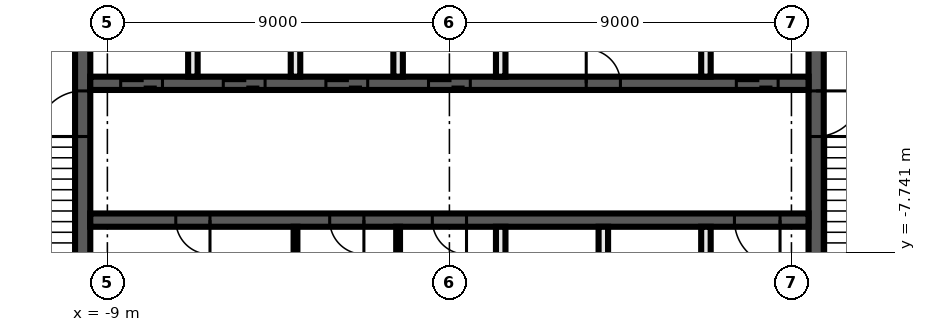
"""IFC4 building model, lengths in metres.
Left out: names, types, materials, properties, quantities, classifications, styles, units other than length and angle.
Written with IfcOpenShell. Run it as: python <this file> out.ifc"""

import sys

from ifc_helpers import new_model, si_unit, direction, frame, frame_2d, origin, place, context, subcontext, project, spatial, rectangle, extrude, element, fill, save


model = new_model("IFC4")
c1 = context("Model", 3, precision=1e-05, world=origin(), true_north=direction((0.0, 1.0)))
c2 = subcontext(c1, "Body", "Model", "MODEL_VIEW")
j1 = project(units=[si_unit("LENGTHUNIT", "METRE"), si_unit("PLANEANGLEUNIT", "RADIAN")], contexts=[c1])
p1 = place(None, origin())
s1 = spatial("IfcSite", under=j1, at=p1, CompositionType="ELEMENT")
p2 = place(p1, origin())
s2 = spatial("IfcBuilding", under=s1, at=p2, CompositionType="ELEMENT")
p3 = place(p2, frame((0.0, 0.0, 245.4)))
s3 = spatial("IfcBuildingStorey", under=s2, at=p3, CompositionType="ELEMENT", Elevation=245.4)
p4 = place(p3, frame((9.65, -2.3, 0.0), z_axis=(0.0, 0.0, 1.0), x_axis=(0.0, -1.0, 0.0)))
e1 = element("IfcWall", 1, at=p4, inside=s3, PredefinedType="SHEAR", context=c2, shape_type="SweptSolid", body=[
    extrude(rectangle(XDim=7.5, YDim=0.4, at=frame_2d((3.75, 0.0))), origin(), (0.0, 0.0, 1.0), 3.82),
])
p5 = place(p4, frame((1.2, 0.0, 0.0)))
e2 = element("IfcOpeningElement", 2, at=p5, cuts=e1, PredefinedType="OPENING", context=c2, shape_type="SweptSolid", body=[
    extrude(rectangle(XDim=1.2, YDim=2.1, at=frame_2d((0.6, 1.05))), frame((0.0, 0.21, 0.0), z_axis=(0.0, -1.0, 0.0), x_axis=(1.0, 0.0, 0.0)), (0.0, 0.0, 1.0), 0.42),
])
p6 = place(p3, frame((-9.65, -9.8, 0.0), z_axis=(0.0, 0.0, 1.0), x_axis=(0.0, 1.0, 0.0)))
e3 = element("IfcWall", 3, at=p6, inside=s3, PredefinedType="SHEAR", context=c2, shape_type="SweptSolid", body=[
    extrude(rectangle(XDim=7.5, YDim=0.4, at=frame_2d((3.75, 0.0))), origin(), (0.0, 0.0, 1.0), 3.82),
])
p7 = place(p6, frame((5.1, 0.0, 0.0)))
e4 = element("IfcOpeningElement", 4, at=p7, cuts=e3, PredefinedType="OPENING", context=c2, shape_type="SweptSolid", body=[
    extrude(rectangle(XDim=1.2, YDim=2.1, at=frame_2d((0.6, 1.05))), frame((0.0, 0.21, 0.0), z_axis=(0.0, -1.0, 0.0), x_axis=(1.0, 0.0, 0.0)), (0.0, 0.0, 1.0), 0.42),
])
p8 = place(p3, frame((-9.45, -3.3, 0.0), z_axis=(0.0, 0.0, 1.0), x_axis=(1.0, 0.0, 0.0)))
e5 = element("IfcWall", 5, at=p8, inside=s3, PredefinedType="SHEAR", context=c2, shape_type="SweptSolid", body=[
    extrude(rectangle(XDim=18.9, YDim=0.35, at=frame_2d((9.45, 0.0))), origin(), (0.0, 0.0, 1.0), 3.82),
])
p9 = place(p8, frame((0.8, 0.0, 0.0)))
e6 = element("IfcOpeningElement", 6, at=p9, cuts=e5, PredefinedType="OPENING", context=c2, shape_type="SweptSolid", body=[
    extrude(rectangle(XDim=1.1, YDim=2.1, at=frame_2d((0.55, 1.05))), frame((0.0, 0.185, 0.0), z_axis=(0.0, -1.0, 0.0), x_axis=(1.0, 0.0, 0.0)), (0.0, 0.0, 1.0), 0.37),
])
p10 = place(p8, frame((3.5, 0.0, 0.0)))
e7 = element("IfcOpeningElement", 7, at=p10, cuts=e5, PredefinedType="OPENING", context=c2, shape_type="SweptSolid", body=[
    extrude(rectangle(XDim=1.1, YDim=2.1, at=frame_2d((0.55, 1.05))), frame((0.0, 0.185, 0.0), z_axis=(0.0, -1.0, 0.0), x_axis=(1.0, 0.0, 0.0)), (0.0, 0.0, 1.0), 0.37),
])
p11 = place(p8, frame((6.2, 0.0, 0.0)))
e8 = element("IfcOpeningElement", 8, at=p11, cuts=e5, PredefinedType="OPENING", context=c2, shape_type="SweptSolid", body=[
    extrude(rectangle(XDim=1.1, YDim=2.1, at=frame_2d((0.55, 1.05))), frame((0.0, 0.185, 0.0), z_axis=(0.0, -1.0, 0.0), x_axis=(1.0, 0.0, 0.0)), (0.0, 0.0, 1.0), 0.37),
])
p12 = place(p8, frame((8.9, 0.0, 0.0)))
e9 = element("IfcOpeningElement", 9, at=p12, cuts=e5, PredefinedType="OPENING", context=c2, shape_type="SweptSolid", body=[
    extrude(rectangle(XDim=1.1, YDim=2.1, at=frame_2d((0.55, 1.05))), frame((0.0, 0.185, 0.0), z_axis=(0.0, -1.0, 0.0), x_axis=(1.0, 0.0, 0.0)), (0.0, 0.0, 1.0), 0.37),
])
p13 = place(p8, frame((17.0, 0.0, 0.0)))
e10 = element("IfcOpeningElement", 10, at=p13, cuts=e5, PredefinedType="OPENING", context=c2, shape_type="SweptSolid", body=[
    extrude(rectangle(XDim=1.1, YDim=2.1, at=frame_2d((0.55, 1.05))), frame((0.0, 0.185, 0.0), z_axis=(0.0, -1.0, 0.0), x_axis=(1.0, 0.0, 0.0)), (0.0, 0.0, 1.0), 0.37),
])
p14 = place(p8, frame((13.05, 0.0, 0.0)))
e11 = element("IfcOpeningElement", 11, at=p14, cuts=e5, PredefinedType="OPENING", context=c2, shape_type="SweptSolid", body=[
    extrude(rectangle(XDim=0.9, YDim=2.1, at=frame_2d((0.45, 1.05))), frame((0.0, 0.185, 0.0), z_axis=(0.0, -1.0, 0.0), x_axis=(1.0, 0.0, 0.0)), (0.0, 0.0, 1.0), 0.37),
])
p15 = place(p3, frame((9.45, -6.9, 0.0), z_axis=(0.0, 0.0, 1.0), x_axis=(-1.0, 0.0, 0.0)))
e12 = element("IfcWall", 12, at=p15, inside=s3, PredefinedType="SHEAR", context=c2, shape_type="SweptSolid", body=[
    extrude(rectangle(XDim=18.9, YDim=0.35, at=frame_2d((9.45, 0.0))), origin(), (0.0, 0.0, 1.0), 3.82),
])
p16 = place(p15, frame((0.75, 0.0, 0.0)))
e13 = element("IfcOpeningElement", 13, at=p16, cuts=e12, PredefinedType="OPENING", context=c2, shape_type="SweptSolid", body=[
    extrude(rectangle(XDim=1.2, YDim=2.1, at=frame_2d((0.6, 1.05))), frame((0.0, 0.185, 0.0), z_axis=(0.0, -1.0, 0.0), x_axis=(1.0, 0.0, 0.0)), (0.0, 0.0, 1.0), 0.37),
])
p17 = place(p15, frame((15.75, 0.0, 0.0)))
e14 = element("IfcOpeningElement", 14, at=p17, cuts=e12, PredefinedType="OPENING", context=c2, shape_type="SweptSolid", body=[
    extrude(rectangle(XDim=0.9, YDim=2.1, at=frame_2d((0.45, 1.05))), frame((0.0, 0.185, 0.0), z_axis=(0.0, -1.0, 0.0), x_axis=(1.0, 0.0, 0.0)), (0.0, 0.0, 1.0), 0.37),
])
p18 = place(p15, frame((11.7, 0.0, 0.0)))
e15 = element("IfcOpeningElement", 15, at=p18, cuts=e12, PredefinedType="OPENING", context=c2, shape_type="SweptSolid", body=[
    extrude(rectangle(XDim=0.9, YDim=2.1, at=frame_2d((0.45, 1.05))), frame((0.0, 0.185, 0.0), z_axis=(0.0, -1.0, 0.0), x_axis=(1.0, 0.0, 0.0)), (0.0, 0.0, 1.0), 0.37),
])
p19 = place(p15, frame((9.0, 0.0, 0.0)))
e16 = element("IfcOpeningElement", 16, at=p19, cuts=e12, PredefinedType="OPENING", context=c2, shape_type="SweptSolid", body=[
    extrude(rectangle(XDim=0.9, YDim=2.1, at=frame_2d((0.45, 1.05))), frame((0.0, 0.185, 0.0), z_axis=(0.0, -1.0, 0.0), x_axis=(1.0, 0.0, 0.0)), (0.0, 0.0, 1.0), 0.37),
])
for number, where, z_axis, x_axis in (
    (17, (6.75, -9.8, 0.0), (0.0, 0.0, 1.0), (0.0, 1.0, 0.0)),
    (18, (6.75, -3.125, 0.0), (0.0, 0.0, 1.0), (0.0, 1.0, 0.0)),
    (19, (4.05, -9.8, 0.0), (0.0, 0.0, 1.0), (0.0, 1.0, 0.0)),
    (20, (1.35, -9.8, 0.0), (0.0, 0.0, 1.0), (0.0, 1.0, 0.0)),
    (21, (1.35, -3.125, 0.0), (0.0, 0.0, 1.0), (0.0, 1.0, 0.0)),
):
    element("IfcWall", number, at=place(p3, frame(where, z_axis=z_axis, x_axis=x_axis)), inside=s3, PredefinedType="SOLIDWALL", context=c2, shape_type="SweptSolid", body=[
        extrude(rectangle(XDim=2.725, YDim=0.25, at=frame_2d((1.363, 0.0))), origin(), (0.0, 0.0, 1.0), 3.82),
    ])
p20 = place(p3, frame((-1.35, -9.8, 0.0), z_axis=(0.0, 0.0, 1.0), x_axis=(0.0, 1.0, 0.0)))
e22 = element("IfcWall", 22, at=p20, inside=s3, PredefinedType="PARTITIONING", context=c2, shape_type="SweptSolid", body=[
    extrude(rectangle(XDim=2.725, YDim=0.1, at=frame_2d((1.363, 0.0))), origin(), (0.0, 0.0, 1.0), 3.82),
])
p21 = place(p3, frame((-1.35, -3.125, 0.0), z_axis=(0.0, 0.0, 1.0), x_axis=(0.0, 1.0, 0.0)))
e23 = element("IfcWall", 23, at=p21, inside=s3, PredefinedType="SOLIDWALL", context=c2, shape_type="SweptSolid", body=[
    extrude(rectangle(XDim=2.725, YDim=0.25, at=frame_2d((1.363, 0.0))), origin(), (0.0, 0.0, 1.0), 3.82),
])
p22 = place(p3, frame((-4.05, -9.8, 0.0), z_axis=(0.0, 0.0, 1.0), x_axis=(0.0, 1.0, 0.0)))
e24 = element("IfcWall", 24, at=p22, inside=s3, PredefinedType="PARTITIONING", context=c2, shape_type="SweptSolid", body=[
    extrude(rectangle(XDim=2.725, YDim=0.1, at=frame_2d((1.363, 0.0))), origin(), (0.0, 0.0, 1.0), 3.82),
])
for number, where, z_axis, x_axis in (
    (25, (-4.05, -3.125, 0.0), (0.0, 0.0, 1.0), (0.0, 1.0, 0.0)),
    (26, (-6.75, -3.125, 0.0), (0.0, 0.0, 1.0), (0.0, 1.0, 0.0)),
):
    element("IfcWall", number, at=place(p3, frame(where, z_axis=z_axis, x_axis=x_axis)), inside=s3, PredefinedType="SOLIDWALL", context=c2, shape_type="SweptSolid", body=[
        extrude(rectangle(XDim=2.725, YDim=0.25, at=frame_2d((1.363, 0.0))), origin(), (0.0, 0.0, 1.0), 3.82),
    ])
p23 = place(p9, origin())
e27 = element("IfcDoor", 27, at=p23, inside=s3, OperationType="DOUBLE_DOOR_SLIDING", PredefinedType="DOOR", context=c2, shape_type="SweptSolid", body=[
    extrude(rectangle(XDim=1.1, YDim=2.1, at=frame_2d((0.55, 1.05))), frame((0.0, 0.025, 0.0), z_axis=(0.0, -1.0, 0.0), x_axis=(1.0, 0.0, 0.0)), (0.0, 0.0, 1.0), 0.05),
])
fill(e6, e27)
p24 = place(p10, origin())
e28 = element("IfcDoor", 28, at=p24, inside=s3, OperationType="DOUBLE_DOOR_SLIDING", PredefinedType="DOOR", context=c2, shape_type="SweptSolid", body=[
    extrude(rectangle(XDim=1.1, YDim=2.1, at=frame_2d((0.55, 1.05))), frame((0.0, 0.025, 0.0), z_axis=(0.0, -1.0, 0.0), x_axis=(1.0, 0.0, 0.0)), (0.0, 0.0, 1.0), 0.05),
])
fill(e7, e28)
p25 = place(p11, origin())
e29 = element("IfcDoor", 29, at=p25, inside=s3, OperationType="DOUBLE_DOOR_SLIDING", PredefinedType="DOOR", context=c2, shape_type="SweptSolid", body=[
    extrude(rectangle(XDim=1.1, YDim=2.1, at=frame_2d((0.55, 1.05))), frame((0.0, 0.025, 0.0), z_axis=(0.0, -1.0, 0.0), x_axis=(1.0, 0.0, 0.0)), (0.0, 0.0, 1.0), 0.05),
])
fill(e8, e29)
p26 = place(p12, origin())
e30 = element("IfcDoor", 30, at=p26, inside=s3, OperationType="DOUBLE_DOOR_SLIDING", PredefinedType="DOOR", context=c2, shape_type="SweptSolid", body=[
    extrude(rectangle(XDim=1.1, YDim=2.1, at=frame_2d((0.55, 1.05))), frame((0.0, 0.025, 0.0), z_axis=(0.0, -1.0, 0.0), x_axis=(1.0, 0.0, 0.0)), (0.0, 0.0, 1.0), 0.05),
])
fill(e9, e30)
p27 = place(p13, origin())
e31 = element("IfcDoor", 31, at=p27, inside=s3, OperationType="DOUBLE_DOOR_SLIDING", PredefinedType="DOOR", context=c2, shape_type="SweptSolid", body=[
    extrude(rectangle(XDim=1.1, YDim=2.1, at=frame_2d((0.55, 1.05))), frame((0.0, 0.025, 0.0), z_axis=(0.0, -1.0, 0.0), x_axis=(1.0, 0.0, 0.0)), (0.0, 0.0, 1.0), 0.05),
])
fill(e10, e31)
p28 = place(p16, origin())
e32 = element("IfcDoor", 32, at=p28, inside=s3, OperationType="SINGLE_SWING_LEFT", PredefinedType="DOOR", context=c2, shape_type="SweptSolid", body=[
    extrude(rectangle(XDim=1.2, YDim=2.1, at=frame_2d((0.6, 1.05))), frame((0.0, 0.025, 0.0), z_axis=(0.0, -1.0, 0.0), x_axis=(1.0, 0.0, 0.0)), (0.0, 0.0, 1.0), 0.05),
])
fill(e13, e32)
p29 = place(p14, origin())
e33 = element("IfcDoor", 33, at=p29, inside=s3, OperationType="SINGLE_SWING_RIGHT", PredefinedType="DOOR", context=c2, shape_type="SweptSolid", body=[
    extrude(rectangle(XDim=0.9, YDim=2.1, at=frame_2d((0.45, 1.05))), frame((0.0, 0.025, 0.0), z_axis=(0.0, -1.0, 0.0), x_axis=(1.0, 0.0, 0.0)), (0.0, 0.0, 1.0), 0.05),
])
fill(e11, e33)
p30 = place(p17, origin())
e34 = element("IfcDoor", 34, at=p30, inside=s3, OperationType="SINGLE_SWING_LEFT", PredefinedType="DOOR", context=c2, shape_type="SweptSolid", body=[
    extrude(rectangle(XDim=0.9, YDim=2.1, at=frame_2d((0.45, 1.05))), frame((0.0, 0.025, 0.0), z_axis=(0.0, -1.0, 0.0), x_axis=(1.0, 0.0, 0.0)), (0.0, 0.0, 1.0), 0.05),
])
fill(e14, e34)
p31 = place(p18, origin())
e35 = element("IfcDoor", 35, at=p31, inside=s3, OperationType="SINGLE_SWING_RIGHT", PredefinedType="DOOR", context=c2, shape_type="SweptSolid", body=[
    extrude(rectangle(XDim=0.9, YDim=2.1, at=frame_2d((0.45, 1.05))), frame((0.0, 0.025, 0.0), z_axis=(0.0, -1.0, 0.0), x_axis=(1.0, 0.0, 0.0)), (0.0, 0.0, 1.0), 0.05),
])
fill(e15, e35)
p32 = place(p19, origin())
e36 = element("IfcDoor", 36, at=p32, inside=s3, OperationType="SINGLE_SWING_LEFT", PredefinedType="DOOR", context=c2, shape_type="SweptSolid", body=[
    extrude(rectangle(XDim=0.9, YDim=2.1, at=frame_2d((0.45, 1.05))), frame((0.0, 0.025, 0.0), z_axis=(0.0, -1.0, 0.0), x_axis=(1.0, 0.0, 0.0)), (0.0, 0.0, 1.0), 0.05),
])
fill(e16, e36)
p33 = place(p5, origin())
e37 = element("IfcDoor", 37, at=p33, inside=s3, OperationType="SINGLE_SWING_RIGHT", PredefinedType="DOOR", context=c2, shape_type="SweptSolid", body=[
    extrude(rectangle(XDim=1.2, YDim=2.1, at=frame_2d((0.6, 1.05))), frame((0.0, 0.025, 0.0), z_axis=(0.0, -1.0, 0.0), x_axis=(1.0, 0.0, 0.0)), (0.0, 0.0, 1.0), 0.05),
])
fill(e2, e37)
p34 = place(p7, origin())
e38 = element("IfcDoor", 38, at=p34, inside=s3, OperationType="SINGLE_SWING_LEFT", PredefinedType="DOOR", context=c2, shape_type="SweptSolid", body=[
    extrude(rectangle(XDim=1.2, YDim=2.1, at=frame_2d((0.6, 1.05))), frame((0.0, 0.025, 0.0), z_axis=(0.0, -1.0, 0.0), x_axis=(1.0, 0.0, 0.0)), (0.0, 0.0, 1.0), 0.05),
])
fill(e4, e38)
save(model, sys.argv[1])
